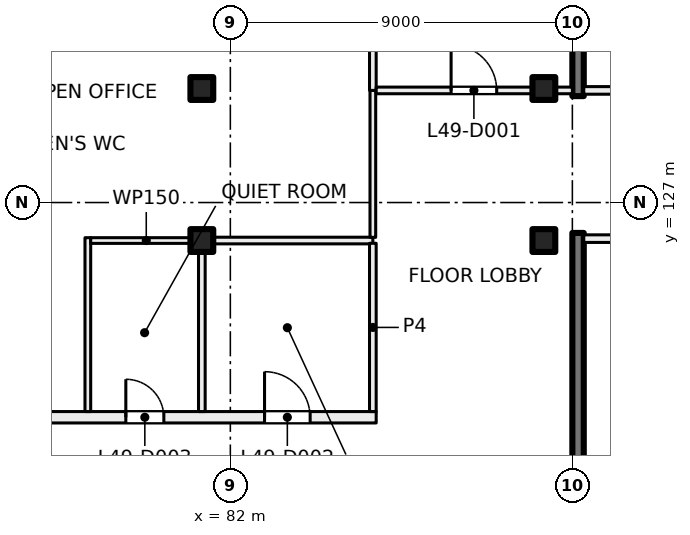
"""IFC4 building model, lengths in metres.
Left out: names, types, materials, properties, quantities, classifications, styles, units other than length and angle.
Written with IfcOpenShell. Run it as: python <this file> out.ifc"""

import sys

from ifc_helpers import new_model, si_unit, direction, frame, frame_2d, origin, origin_2d, place, context, subcontext, project, spatial, rectangle, extrude, element, fill, save


model = new_model("IFC4")
c1 = context("Model", 3, precision=1e-05, world=origin(), true_north=direction((0.0, 1.0)))
c2 = subcontext(c1, "Body", "Model", "MODEL_VIEW")
j1 = project(units=[si_unit("LENGTHUNIT", "METRE"), si_unit("PLANEANGLEUNIT", "RADIAN")], contexts=[c1])
p1 = place(None, origin())
s1 = spatial("IfcSite", under=j1, at=p1, CompositionType="ELEMENT")
p2 = place(p1, origin())
s2 = spatial("IfcBuilding", under=s1, at=p2, CompositionType="ELEMENT")
p3 = place(p2, frame((0.0, 0.0, 208.0)))
s3 = spatial("IfcBuildingStorey", under=s2, at=p3, CompositionType="ELEMENT", Elevation=208.0)
for number, where, z_axis, x_axis in (
    (1, (81.25, 130.0, 0.0), (0.0, 0.0, 1.0), (1.0, 0.0, 0.0)),
    (2, (90.25, 130.0, 0.0), (0.0, 0.0, 1.0), (1.0, 0.0, 0.0)),
    (3, (81.25, 126.0, 0.0), (0.0, 0.0, 1.0), (1.0, 0.0, 0.0)),
    (4, (90.25, 126.0, 0.0), (0.0, 0.0, 1.0), (1.0, 0.0, 0.0)),
):
    element("IfcColumn", number, at=place(p3, frame(where, z_axis=z_axis, x_axis=x_axis)), inside=s3, PredefinedType="COLUMN", context=c2, shape_type="SweptSolid", body=[
        extrude(rectangle(XDim=0.6, YDim=0.6, at=origin_2d()), origin(), (0.0, 0.0, 1.0), 4.0),
    ])
for number, where, z_axis, x_axis in (
    (5, (91.15, 138.5, 0.0), (0.0, 0.0, 1.0), (0.0, -1.0, 0.0)),
    (6, (91.15, 126.2, 0.0), (0.0, 0.0, 1.0), (0.0, -1.0, 0.0)),
):
    element("IfcWall", number, at=place(p3, frame(where, z_axis=z_axis, x_axis=x_axis)), inside=s3, PredefinedType="SHEAR", context=c2, shape_type="SweptSolid", body=[
        extrude(rectangle(XDim=8.7, YDim=0.3, at=frame_2d((4.35, 0.0))), origin(), (0.0, 0.0, 1.0), 4.0),
    ])
p4 = place(p3, frame((95.25, 126.05, 0.0), z_axis=(0.0, 0.0, 1.0), x_axis=(-1.0, 0.0, 0.0)))
e7 = element("IfcWall", 7, at=p4, inside=s3, PredefinedType="PARTITIONING", context=c2, shape_type="SweptSolid", body=[
    extrude(rectangle(XDim=3.95, YDim=0.2, at=frame_2d((1.975, 0.0))), origin(), (0.0, 0.0, 1.0), 3.625),
])
p5 = place(p4, frame((0.3, 0.0, 0.0)))
e8 = element("IfcOpeningElement", 8, at=p5, cuts=e7, PredefinedType="OPENING", context=c2, shape_type="SweptSolid", body=[
    extrude(rectangle(XDim=1.2, YDim=2.1, at=frame_2d((0.6, 1.05))), frame((0.0, 0.11, 0.0), z_axis=(0.0, -1.0, 0.0), x_axis=(1.0, 0.0, 0.0)), (0.0, 0.0, 1.0), 0.22),
])
p6 = place(p3, frame((91.3, 129.95, 0.0), z_axis=(0.0, 0.0, 1.0), x_axis=(1.0, 0.0, 0.0)))
e9 = element("IfcWall", 9, at=p6, inside=s3, PredefinedType="PARTITIONING", context=c2, shape_type="SweptSolid", body=[
    extrude(rectangle(XDim=3.95, YDim=0.2, at=frame_2d((1.975, 0.0))), origin(), (0.0, 0.0, 1.0), 3.625),
])
p7 = place(p6, frame((2.45, 0.0, 0.0)))
e10 = element("IfcOpeningElement", 10, at=p7, cuts=e9, PredefinedType="OPENING", context=c2, shape_type="SweptSolid", body=[
    extrude(rectangle(XDim=1.2, YDim=2.1, at=frame_2d((0.6, 1.05))), frame((0.0, 0.11, 0.0), z_axis=(0.0, -1.0, 0.0), x_axis=(1.0, 0.0, 0.0)), (0.0, 0.0, 1.0), 0.22),
])
p8 = place(p3, frame((50.506, 121.35, 0.0), z_axis=(0.0, 0.0, 1.0), x_axis=(1.0, 0.0, 0.0)))
e11 = element("IfcWall", 11, at=p8, inside=s3, PredefinedType="PARTITIONING", context=c2, shape_type="SweptSolid", body=[
    extrude(rectangle(XDim=35.332, YDim=0.3, at=frame_2d((17.666, 0.0))), origin(), (0.0, 0.0, 1.0), 3.625),
])
p9 = place(p8, frame((32.394, 0.0, 0.0)))
e12 = element("IfcOpeningElement", 12, at=p9, cuts=e11, PredefinedType="OPENING", context=c2, shape_type="SweptSolid", body=[
    extrude(rectangle(XDim=1.2, YDim=2.1, at=frame_2d((0.6, 1.05))), frame((0.0, 0.16, 0.0), z_axis=(0.0, -1.0, 0.0), x_axis=(1.0, 0.0, 0.0)), (0.0, 0.0, 1.0), 0.32),
])
p10 = place(p8, frame((28.744, 0.0, 0.0)))
e13 = element("IfcOpeningElement", 13, at=p10, cuts=e11, PredefinedType="OPENING", context=c2, shape_type="SweptSolid", body=[
    extrude(rectangle(XDim=1.0, YDim=2.1, at=frame_2d((0.5, 1.05))), frame((0.0, 0.16, 0.0), z_axis=(0.0, -1.0, 0.0), x_axis=(1.0, 0.0, 0.0)), (0.0, 0.0, 1.0), 0.32),
])
p11 = place(p8, frame((23.844, 0.0, 0.0)))
e14 = element("IfcOpeningElement", 14, at=p11, cuts=e11, PredefinedType="OPENING", context=c2, shape_type="SweptSolid", body=[
    extrude(rectangle(XDim=1.8, YDim=2.1, at=frame_2d((0.9, 1.05))), frame((0.0, 0.16, 0.0), z_axis=(0.0, -1.0, 0.0), x_axis=(1.0, 0.0, 0.0)), (0.0, 0.0, 1.0), 0.32),
])
p12 = place(p8, frame((16.744, 0.0, 0.0)))
e15 = element("IfcOpeningElement", 15, at=p12, cuts=e11, PredefinedType="OPENING", context=c2, shape_type="SweptSolid", body=[
    extrude(rectangle(XDim=1.0, YDim=2.1, at=frame_2d((0.5, 1.05))), frame((0.0, 0.16, 0.0), z_axis=(0.0, -1.0, 0.0), x_axis=(1.0, 0.0, 0.0)), (0.0, 0.0, 1.0), 0.32),
])
p13 = place(p8, frame((7.344, 0.0, 0.0)))
e16 = element("IfcOpeningElement", 16, at=p13, cuts=e11, PredefinedType="OPENING", context=c2, shape_type="SweptSolid", body=[
    extrude(rectangle(XDim=1.8, YDim=2.1, at=frame_2d((0.9, 1.05))), frame((0.0, 0.16, 0.0), z_axis=(0.0, -1.0, 0.0), x_axis=(1.0, 0.0, 0.0)), (0.0, 0.0, 1.0), 0.32),
])
p14 = place(p8, frame((1.047, 0.0, 0.0)))
e17 = element("IfcOpeningElement", 17, at=p14, cuts=e11, PredefinedType="OPENING", context=c2, shape_type="SweptSolid", body=[
    extrude(rectangle(XDim=1.8, YDim=2.1, at=frame_2d((0.9, 1.05))), frame((0.0, 0.16, 0.0), z_axis=(0.0, -1.0, 0.0), x_axis=(1.0, 0.0, 0.0)), (0.0, 0.0, 1.0), 0.32),
])
p15 = place(p3, frame((78.25, 126.075, 0.0), z_axis=(0.0, 0.0, 1.0), x_axis=(0.0, -1.0, 0.0)))
e18 = element("IfcWall", 18, at=p15, inside=s3, PredefinedType="PARTITIONING", context=c2, shape_type="SweptSolid", body=[
    extrude(rectangle(XDim=4.575, YDim=0.15, at=frame_2d((2.288, 0.0))), origin(), (0.0, 0.0, 1.0), 3.625),
])
p16 = place(p3, frame((81.25, 121.5, 0.0), z_axis=(0.0, 0.0, 1.0), x_axis=(0.0, 1.0, 0.0)))
e19 = element("IfcWall", 19, at=p16, inside=s3, PredefinedType="PARTITIONING", context=c2, shape_type="SweptSolid", body=[
    extrude(rectangle(XDim=4.412, YDim=0.175, at=frame_2d((2.206, 0.0))), origin(), (0.0, 0.0, 1.0), 3.625),
])
p17 = place(p3, frame((81.25, 126.0, 0.0), z_axis=(0.0, 0.0, 1.0), x_axis=(-1.0, 0.0, 0.0)))
e20 = element("IfcWall", 20, at=p17, inside=s3, PredefinedType="PARTITIONING", context=c2, shape_type="SweptSolid", body=[
    extrude(rectangle(XDim=2.925, YDim=0.15, at=frame_2d((1.462, 0.0))), origin(), (0.0, 0.0, 1.0), 3.625),
])
p18 = place(p3, frame((81.25, 126.0, 0.0), z_axis=(0.0, 0.0, 1.0), x_axis=(1.0, 0.0, 0.0)))
e21 = element("IfcWall", 21, at=p18, inside=s3, PredefinedType="PARTITIONING", context=c2, shape_type="SweptSolid", body=[
    extrude(rectangle(XDim=4.5, YDim=0.175, at=frame_2d((2.25, 0.0))), origin(), (0.0, 0.0, 1.0), 3.625),
])
p19 = place(p3, frame((85.75, 121.5, 0.0), z_axis=(0.0, 0.0, 1.0), x_axis=(0.0, 1.0, 0.0)))
e22 = element("IfcWall", 22, at=p19, inside=s3, PredefinedType="PARTITIONING", context=c2, shape_type="SweptSolid", body=[
    extrude(rectangle(XDim=4.428, YDim=0.175, at=frame_2d((2.214, 0.0))), origin(), (0.0, 0.0, 1.0), 3.625),
])
p20 = place(p3, frame((85.75, 126.084, 0.0), z_axis=(0.0, 0.0, 1.0), x_axis=(0.0, 1.0, 0.0)))
e23 = element("IfcWall", 23, at=p20, inside=s3, PredefinedType="PARTITIONING", context=c2, shape_type="SweptSolid", body=[
    extrude(rectangle(XDim=3.866, YDim=0.15, at=frame_2d((1.933, 0.0))), origin(), (0.0, 0.0, 1.0), 3.625),
])
p21 = place(p3, frame((85.75, 129.95, 0.0), z_axis=(0.0, 0.0, 1.0), x_axis=(0.0, 1.0, 0.0)))
e24 = element("IfcWall", 24, at=p21, inside=s3, PredefinedType="PARTITIONING", context=c2, shape_type="SweptSolid", body=[
    extrude(rectangle(XDim=8.45, YDim=0.175, at=frame_2d((4.225, 0.0))), origin(), (0.0, 0.0, 1.0), 3.625),
])
p22 = place(p3, frame((85.838, 129.95, 0.0), z_axis=(0.0, 0.0, 1.0), x_axis=(1.0, 0.0, 0.0)))
e25 = element("IfcWall", 25, at=p22, inside=s3, PredefinedType="PARTITIONING", context=c2, shape_type="SweptSolid", body=[
    extrude(rectangle(XDim=5.162, YDim=0.175, at=frame_2d((2.581, 0.0))), origin(), (0.0, 0.0, 1.0), 3.625),
])
p23 = place(p22, frame((1.971, 0.0, 0.0)))
e26 = element("IfcOpeningElement", 26, at=p23, cuts=e25, PredefinedType="OPENING", context=c2, shape_type="SweptSolid", body=[
    extrude(rectangle(XDim=1.2, YDim=2.1, at=frame_2d((0.6, 1.05))), frame((0.0, 0.097, 0.0), z_axis=(0.0, -1.0, 0.0), x_axis=(1.0, 0.0, 0.0)), (0.0, 0.0, 1.0), 0.195),
])
p24 = place(p23, origin())
e27 = element("IfcDoor", 27, at=p24, inside=s3, OperationType="DOUBLE_DOOR_SINGLE_SWING", PredefinedType="DOOR", context=c2, shape_type="SweptSolid", body=[
    extrude(rectangle(XDim=1.2, YDim=2.1, at=frame_2d((0.6, 1.05))), frame((0.0, 0.025, 0.0), z_axis=(0.0, -1.0, 0.0), x_axis=(1.0, 0.0, 0.0)), (0.0, 0.0, 1.0), 0.05),
])
fill(e26, e27)
p25 = place(p9, origin())
e28 = element("IfcDoor", 28, at=p25, inside=s3, OperationType="DOUBLE_DOOR_SINGLE_SWING", PredefinedType="DOOR", context=c2, shape_type="SweptSolid", body=[
    extrude(rectangle(XDim=1.2, YDim=2.1, at=frame_2d((0.6, 1.05))), frame((0.0, 0.025, 0.0), z_axis=(0.0, -1.0, 0.0), x_axis=(1.0, 0.0, 0.0)), (0.0, 0.0, 1.0), 0.05),
])
fill(e12, e28)
p26 = place(p10, origin())
e29 = element("IfcDoor", 29, at=p26, inside=s3, OperationType="SINGLE_SWING_LEFT", PredefinedType="DOOR", context=c2, shape_type="SweptSolid", body=[
    extrude(rectangle(XDim=1.0, YDim=2.1, at=frame_2d((0.5, 1.05))), frame((0.0, 0.025, 0.0), z_axis=(0.0, -1.0, 0.0), x_axis=(1.0, 0.0, 0.0)), (0.0, 0.0, 1.0), 0.05),
])
fill(e13, e29)
save(model, sys.argv[1])
